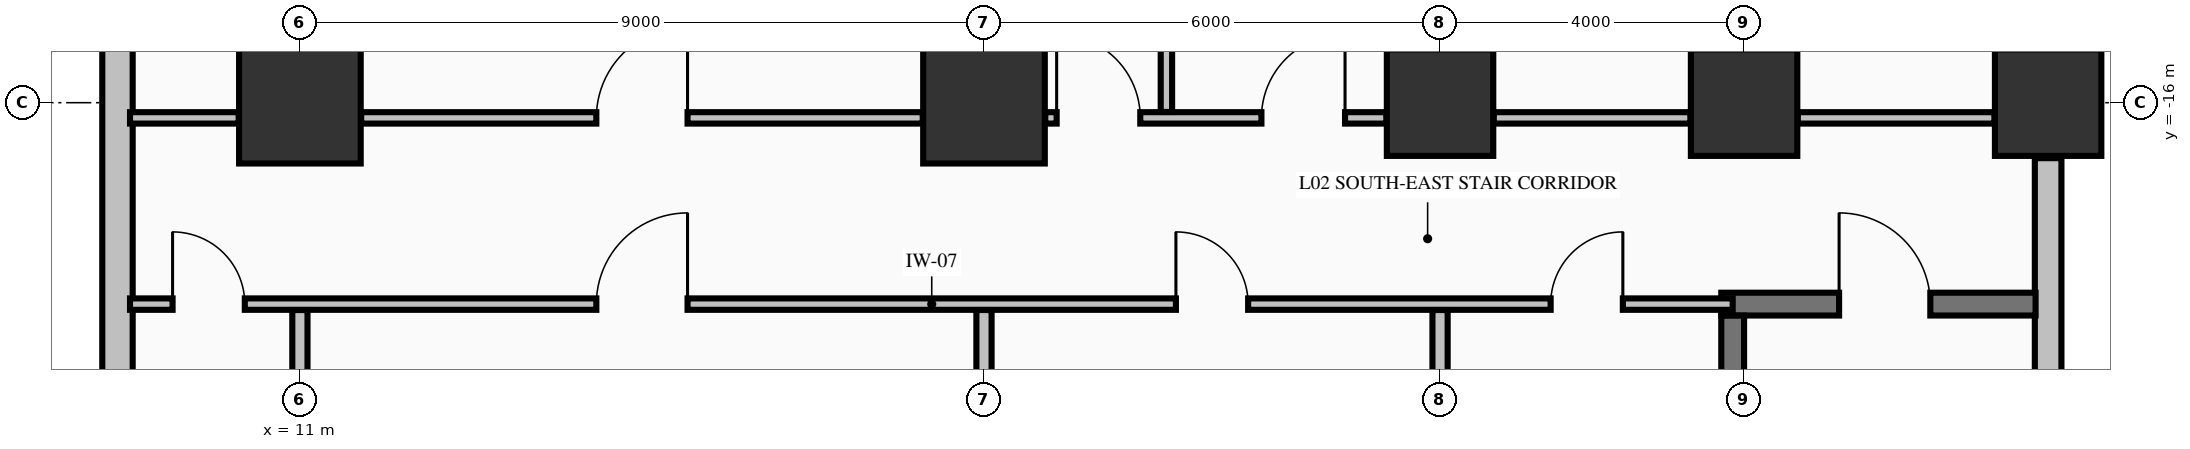
"""IFC4 building model, lengths in metres.
Left out: names, types, materials, properties, quantities, classifications, styles, units other than length and angle.
Written with IfcOpenShell. Run it as: python <this file> out.ifc"""

import sys

from ifc_helpers import new_model, si_unit, direction, frame, frame_2d, origin, origin_2d, place, context, subcontext, project, spatial, rectangle, extrude, element, fill, save


model = new_model("IFC4")
c1 = context("Model", 3, precision=1e-05, world=origin(), true_north=direction((0.0, 1.0)))
c2 = subcontext(c1, "Body", "Model", "MODEL_VIEW")
j1 = project(units=[si_unit("LENGTHUNIT", "METRE"), si_unit("PLANEANGLEUNIT", "RADIAN")], contexts=[c1])
p1 = place(None, origin())
s1 = spatial("IfcSite", under=j1, at=p1, CompositionType="ELEMENT")
p2 = place(p1, origin())
s2 = spatial("IfcBuilding", under=s1, at=p2, CompositionType="ELEMENT")
p3 = place(p2, frame((0.0, 0.0, 10.88)))
s3 = spatial("IfcBuildingStorey", under=s2, at=p3, CompositionType="ELEMENT", Elevation=10.88)
for number, where, z_axis, x_axis in (
    (1, (11.0, -16.0, 0.0), (0.0, 0.0, 1.0), (1.0, 0.0, 0.0)),
    (2, (20.0, -16.0, 0.0), (0.0, 0.0, 1.0), (1.0, 0.0, 0.0)),
):
    element("IfcColumn", number, at=place(p3, frame(where, z_axis=z_axis, x_axis=x_axis)), inside=s3, PredefinedType="COLUMN", context=c2, shape_type="SweptSolid", body=[
        extrude(rectangle(XDim=1.6, YDim=1.6, at=origin_2d()), origin(), (0.0, 0.0, 1.0), 5.09),
    ])
for number, where, z_axis, x_axis in (
    (3, (26.0, -16.0, 0.0), (0.0, 0.0, 1.0), (1.0, 0.0, 0.0)),
    (4, (30.0, -16.0, 0.0), (0.0, 0.0, 1.0), (1.0, 0.0, 0.0)),
    (5, (34.0, -16.0, 0.0), (0.0, 0.0, 1.0), (1.0, 0.0, 0.0)),
):
    element("IfcColumn", number, at=place(p3, frame(where, z_axis=z_axis, x_axis=x_axis)), inside=s3, PredefinedType="COLUMN", context=c2, shape_type="SweptSolid", body=[
        extrude(rectangle(XDim=1.4, YDim=1.4, at=origin_2d()), origin(), (0.0, 0.0, 1.0), 5.09),
    ])
p4 = place(p3, frame((34.0, -16.73, 0.0), z_axis=(0.0, 0.0, 1.0), x_axis=(0.0, -1.0, 0.0)))
e6 = element("IfcWall", 6, at=p4, inside=s3, PredefinedType="STANDARD", context=c2, shape_type="SweptSolid", body=[
    extrude(rectangle(XDim=4.54, YDim=0.35, at=frame_2d((2.27, 0.0))), origin(), (0.0, 0.0, 1.0), 5.09),
])
p5 = place(p3, frame((8.6, -0.65, 0.0), z_axis=(0.0, 0.0, 1.0), x_axis=(0.0, -1.0, 0.0)))
e7 = element("IfcWall", 7, at=p5, inside=s3, PredefinedType="STANDARD", context=c2, shape_type="SweptSolid", body=[
    extrude(rectangle(XDim=24.72, YDim=0.4, at=frame_2d((12.36, 0.0))), origin(), (0.0, 0.0, 1.0), 4.132),
])
p6 = place(p3, frame((29.7, -18.65, 0.0), z_axis=(0.0, 0.0, 1.0), x_axis=(1.0, 0.0, 0.0)))
e8 = element("IfcWall", 8, at=p6, inside=s3, PredefinedType="SHEAR", context=c2, shape_type="SweptSolid", body=[
    extrude(rectangle(XDim=4.135, YDim=0.3, at=frame_2d((2.067, 0.0))), origin(), (0.0, 0.0, 1.0), 5.09),
])
p7 = place(p6, frame((1.55, 0.0, 0.0)))
e9 = element("IfcOpeningElement", 9, at=p7, cuts=e8, PredefinedType="OPENING", context=c2, shape_type="SweptSolid", body=[
    extrude(rectangle(XDim=1.2, YDim=2.15, at=frame_2d((0.6, 1.075))), frame((0.0, 0.16, 0.0), z_axis=(0.0, -1.0, 0.0), x_axis=(1.0, 0.0, 0.0)), (0.0, 0.0, 1.0), 0.32),
])
p8 = place(p3, frame((8.765, -18.65, 0.0), z_axis=(0.0, 0.0, 1.0), x_axis=(1.0, 0.0, 0.0)))
e10 = element("IfcWall", 10, at=p8, inside=s3, PredefinedType="PARTITIONING", context=c2, shape_type="SweptSolid", body=[
    extrude(rectangle(XDim=21.085, YDim=0.15, at=frame_2d((10.542, 0.0))), origin(), (0.0, 0.0, 1.0), 5.09),
])
p9 = place(p8, frame((0.56, 0.0, 0.0)))
e11 = element("IfcOpeningElement", 11, at=p9, cuts=e10, PredefinedType="OPENING", context=c2, shape_type="SweptSolid", body=[
    extrude(rectangle(XDim=0.95, YDim=2.15, at=frame_2d((0.475, 1.075))), frame((0.0, 0.085, 0.0), z_axis=(0.0, -1.0, 0.0), x_axis=(1.0, 0.0, 0.0)), (0.0, 0.0, 1.0), 0.17),
])
p10 = place(p8, frame((6.135, 0.0, 0.0)))
e12 = element("IfcOpeningElement", 12, at=p10, cuts=e10, PredefinedType="OPENING", context=c2, shape_type="SweptSolid", body=[
    extrude(rectangle(XDim=1.2, YDim=2.15, at=frame_2d((0.6, 1.075))), frame((0.0, 0.085, 0.0), z_axis=(0.0, -1.0, 0.0), x_axis=(1.0, 0.0, 0.0)), (0.0, 0.0, 1.0), 0.17),
])
p11 = place(p8, frame((13.76, 0.0, 0.0)))
e13 = element("IfcOpeningElement", 13, at=p11, cuts=e10, PredefinedType="OPENING", context=c2, shape_type="SweptSolid", body=[
    extrude(rectangle(XDim=0.95, YDim=2.15, at=frame_2d((0.475, 1.075))), frame((0.0, 0.085, 0.0), z_axis=(0.0, -1.0, 0.0), x_axis=(1.0, 0.0, 0.0)), (0.0, 0.0, 1.0), 0.17),
])
p12 = place(p8, frame((18.69, 0.0, 0.0)))
e14 = element("IfcOpeningElement", 14, at=p12, cuts=e10, PredefinedType="OPENING", context=c2, shape_type="SweptSolid", body=[
    extrude(rectangle(XDim=0.95, YDim=2.15, at=frame_2d((0.475, 1.075))), frame((0.0, 0.085, 0.0), z_axis=(0.0, -1.0, 0.0), x_axis=(1.0, 0.0, 0.0)), (0.0, 0.0, 1.0), 0.17),
])
p13 = place(p3, frame((8.765, -16.2, 0.0), z_axis=(0.0, 0.0, 1.0), x_axis=(1.0, 0.0, 0.0)))
e15 = element("IfcWall", 15, at=p13, inside=s3, PredefinedType="PARTITIONING", context=c2, shape_type="SweptSolid", body=[
    extrude(rectangle(XDim=1.429, YDim=0.15, at=frame_2d((0.715, 0.0))), origin(), (0.0, 0.0, 1.0), 5.09),
])
p14 = place(p3, frame((11.806, -16.2, 0.0), z_axis=(0.0, 0.0, 1.0), x_axis=(1.0, 0.0, 0.0)))
e16 = element("IfcWall", 16, at=p14, inside=s3, PredefinedType="PARTITIONING", context=c2, shape_type="SweptSolid", body=[
    extrude(rectangle(XDim=7.388, YDim=0.15, at=frame_2d((3.694, 0.0))), origin(), (0.0, 0.0, 1.0), 4.132),
])
p15 = place(p14, frame((3.094, 0.0, 0.0)))
e17 = element("IfcOpeningElement", 17, at=p15, cuts=e16, PredefinedType="OPENING", context=c2, shape_type="SweptSolid", body=[
    extrude(rectangle(XDim=1.2, YDim=2.15, at=frame_2d((0.6, 1.075))), frame((0.0, 0.085, 0.0), z_axis=(0.0, -1.0, 0.0), x_axis=(1.0, 0.0, 0.0)), (0.0, 0.0, 1.0), 0.17),
])
p16 = place(p3, frame((20.806, -16.2, 0.0), z_axis=(0.0, 0.0, 1.0), x_axis=(1.0, 0.0, 0.0)))
e18 = element("IfcWall", 18, at=p16, inside=s3, PredefinedType="PARTITIONING", context=c2, shape_type="SweptSolid", body=[
    extrude(rectangle(XDim=4.488, YDim=0.15, at=frame_2d((2.244, 0.0))), origin(), (0.0, 0.0, 1.0), 4.132),
])
p17 = place(p16, frame((0.15, 0.0, 0.0)))
e19 = element("IfcOpeningElement", 19, at=p17, cuts=e18, PredefinedType="OPENING", context=c2, shape_type="SweptSolid", body=[
    extrude(rectangle(XDim=1.1, YDim=2.15, at=frame_2d((0.55, 1.075))), frame((0.0, 0.085, 0.0), z_axis=(0.0, -1.0, 0.0), x_axis=(1.0, 0.0, 0.0)), (0.0, 0.0, 1.0), 0.17),
])
p18 = place(p16, frame((2.844, 0.0, 0.0)))
e20 = element("IfcOpeningElement", 20, at=p18, cuts=e18, PredefinedType="OPENING", context=c2, shape_type="SweptSolid", body=[
    extrude(rectangle(XDim=1.1, YDim=2.15, at=frame_2d((0.55, 1.075))), frame((0.0, 0.085, 0.0), z_axis=(0.0, -1.0, 0.0), x_axis=(1.0, 0.0, 0.0)), (0.0, 0.0, 1.0), 0.17),
])
for number, where, z_axis, x_axis in (
    (21, (26.706, -16.2, 0.0), (0.0, 0.0, 1.0), (1.0, 0.0, 0.0)),
    (22, (30.706, -16.2, 0.0), (0.0, 0.0, 1.0), (1.0, 0.0, 0.0)),
):
    element("IfcWall", number, at=place(p3, frame(where, z_axis=z_axis, x_axis=x_axis)), inside=s3, PredefinedType="PARTITIONING", context=c2, shape_type="SweptSolid", body=[
        extrude(rectangle(XDim=2.588, YDim=0.15, at=frame_2d((1.294, 0.0))), origin(), (0.0, 0.0, 1.0), 4.132),
    ])
p19 = place(p3, frame((29.85, -28.296, 0.0), z_axis=(0.0, 0.0, 1.0), x_axis=(0.0, 1.0, 0.0)))
e23 = element("IfcWall", 23, at=p19, inside=s3, PredefinedType="SHEAR", context=c2, shape_type="SweptSolid", body=[
    extrude(rectangle(XDim=9.494, YDim=0.3, at=frame_2d((4.747, 0.0))), origin(), (0.0, 0.0, 1.0), 5.09),
])
for number, where, z_axis, x_axis in (
    (24, (11.0, -21.194, 0.0), (0.0, 0.0, 1.0), (0.0, 1.0, 0.0)),
    (25, (20.0, -21.194, 0.0), (0.0, 0.0, 1.0), (0.0, 1.0, 0.0)),
):
    element("IfcWall", number, at=place(p3, frame(where, z_axis=z_axis, x_axis=x_axis)), inside=s3, PredefinedType="PARTITIONING", context=c2, shape_type="SweptSolid", body=[
        extrude(rectangle(XDim=2.466, YDim=0.2, at=frame_2d((1.233, 0.0))), origin(), (0.0, 0.0, 1.0), 4.132),
    ])
p20 = place(p3, frame((22.4, -16.122, 0.0), z_axis=(0.0, 0.0, 1.0), x_axis=(0.0, 1.0, 0.0)))
e26 = element("IfcWall", 26, at=p20, inside=s3, PredefinedType="PARTITIONING", context=c2, shape_type="SweptSolid", body=[
    extrude(rectangle(XDim=32.044, YDim=0.15, at=frame_2d((16.022, 0.0))), origin(), (0.0, 0.0, 1.0), 5.09),
])
p21 = place(p20, frame((10.522, 0.0, 0.0)))
e27 = element("IfcOpeningElement", 27, at=p21, cuts=e26, PredefinedType="OPENING", context=c2, shape_type="SweptSolid", body=[
    extrude(rectangle(XDim=1.2, YDim=2.15, at=frame_2d((0.6, 1.075))), frame((0.0, 0.085, 0.0), z_axis=(0.0, -1.0, 0.0), x_axis=(1.0, 0.0, 0.0)), (0.0, 0.0, 1.0), 0.17),
])
p22 = place(p20, frame((20.522, 0.0, 0.0)))
e28 = element("IfcOpeningElement", 28, at=p22, cuts=e26, PredefinedType="OPENING", context=c2, shape_type="SweptSolid", body=[
    extrude(rectangle(XDim=1.2, YDim=2.15, at=frame_2d((0.6, 1.075))), frame((0.0, 0.085, 0.0), z_axis=(0.0, -1.0, 0.0), x_axis=(1.0, 0.0, 0.0)), (0.0, 0.0, 1.0), 0.17),
])
p23 = place(p3, frame((26.0, -21.294, 0.0), z_axis=(0.0, 0.0, 1.0), x_axis=(0.0, 1.0, 0.0)))
e29 = element("IfcWall", 29, at=p23, inside=s3, PredefinedType="PARTITIONING", context=c2, shape_type="SweptSolid", body=[
    extrude(rectangle(XDim=2.566, YDim=0.2, at=frame_2d((1.283, 0.0))), origin(), (0.0, 0.0, 1.0), 4.132),
])
p24 = place(p7, origin())
e30 = element("IfcDoor", 30, at=p24, inside=s3, OperationType="SINGLE_SWING_LEFT", PredefinedType="DOOR", context=c2, shape_type="SweptSolid", body=[
    extrude(rectangle(XDim=1.2, YDim=2.15, at=frame_2d((0.6, 1.075))), frame((0.0, 0.025, 0.0), z_axis=(0.0, -1.0, 0.0), x_axis=(1.0, 0.0, 0.0)), (0.0, 0.0, 1.0), 0.05),
])
fill(e9, e30)
p25 = place(p15, origin())
e31 = element("IfcDoor", 31, at=p25, inside=s3, OperationType="SINGLE_SWING_RIGHT", PredefinedType="DOOR", context=c2, shape_type="SweptSolid", body=[
    extrude(rectangle(XDim=1.2, YDim=2.15, at=frame_2d((0.6, 1.075))), frame((0.0, 0.025, 0.0), z_axis=(0.0, -1.0, 0.0), x_axis=(1.0, 0.0, 0.0)), (0.0, 0.0, 1.0), 0.05),
])
fill(e17, e31)
p26 = place(p17, origin())
e32 = element("IfcDoor", 32, at=p26, inside=s3, OperationType="SINGLE_SWING_LEFT", PredefinedType="DOOR", context=c2, shape_type="SweptSolid", body=[
    extrude(rectangle(XDim=1.1, YDim=2.15, at=frame_2d((0.55, 1.075))), frame((0.0, 0.025, 0.0), z_axis=(0.0, -1.0, 0.0), x_axis=(1.0, 0.0, 0.0)), (0.0, 0.0, 1.0), 0.05),
])
fill(e19, e32)
p27 = place(p18, origin())
e33 = element("IfcDoor", 33, at=p27, inside=s3, OperationType="SINGLE_SWING_RIGHT", PredefinedType="DOOR", context=c2, shape_type="SweptSolid", body=[
    extrude(rectangle(XDim=1.1, YDim=2.15, at=frame_2d((0.55, 1.075))), frame((0.0, 0.025, 0.0), z_axis=(0.0, -1.0, 0.0), x_axis=(1.0, 0.0, 0.0)), (0.0, 0.0, 1.0), 0.05),
])
fill(e20, e33)
p28 = place(p9, origin())
e34 = element("IfcDoor", 34, at=p28, inside=s3, OperationType="SINGLE_SWING_LEFT", PredefinedType="DOOR", context=c2, shape_type="SweptSolid", body=[
    extrude(rectangle(XDim=0.95, YDim=2.15, at=frame_2d((0.475, 1.075))), frame((0.0, 0.025, 0.0), z_axis=(0.0, -1.0, 0.0), x_axis=(1.0, 0.0, 0.0)), (0.0, 0.0, 1.0), 0.05),
])
fill(e11, e34)
p29 = place(p10, origin())
e35 = element("IfcDoor", 35, at=p29, inside=s3, OperationType="SINGLE_SWING_RIGHT", PredefinedType="DOOR", context=c2, shape_type="SweptSolid", body=[
    extrude(rectangle(XDim=1.2, YDim=2.15, at=frame_2d((0.6, 1.075))), frame((0.0, 0.025, 0.0), z_axis=(0.0, -1.0, 0.0), x_axis=(1.0, 0.0, 0.0)), (0.0, 0.0, 1.0), 0.05),
])
fill(e12, e35)
p30 = place(p11, origin())
e36 = element("IfcDoor", 36, at=p30, inside=s3, OperationType="SINGLE_SWING_LEFT", PredefinedType="DOOR", context=c2, shape_type="SweptSolid", body=[
    extrude(rectangle(XDim=0.95, YDim=2.15, at=frame_2d((0.475, 1.075))), frame((0.0, 0.025, 0.0), z_axis=(0.0, -1.0, 0.0), x_axis=(1.0, 0.0, 0.0)), (0.0, 0.0, 1.0), 0.05),
])
fill(e13, e36)
p31 = place(p12, origin())
e37 = element("IfcDoor", 37, at=p31, inside=s3, OperationType="SINGLE_SWING_RIGHT", PredefinedType="DOOR", context=c2, shape_type="SweptSolid", body=[
    extrude(rectangle(XDim=0.95, YDim=2.15, at=frame_2d((0.475, 1.075))), frame((0.0, 0.025, 0.0), z_axis=(0.0, -1.0, 0.0), x_axis=(1.0, 0.0, 0.0)), (0.0, 0.0, 1.0), 0.05),
])
fill(e14, e37)
save(model, sys.argv[1])
